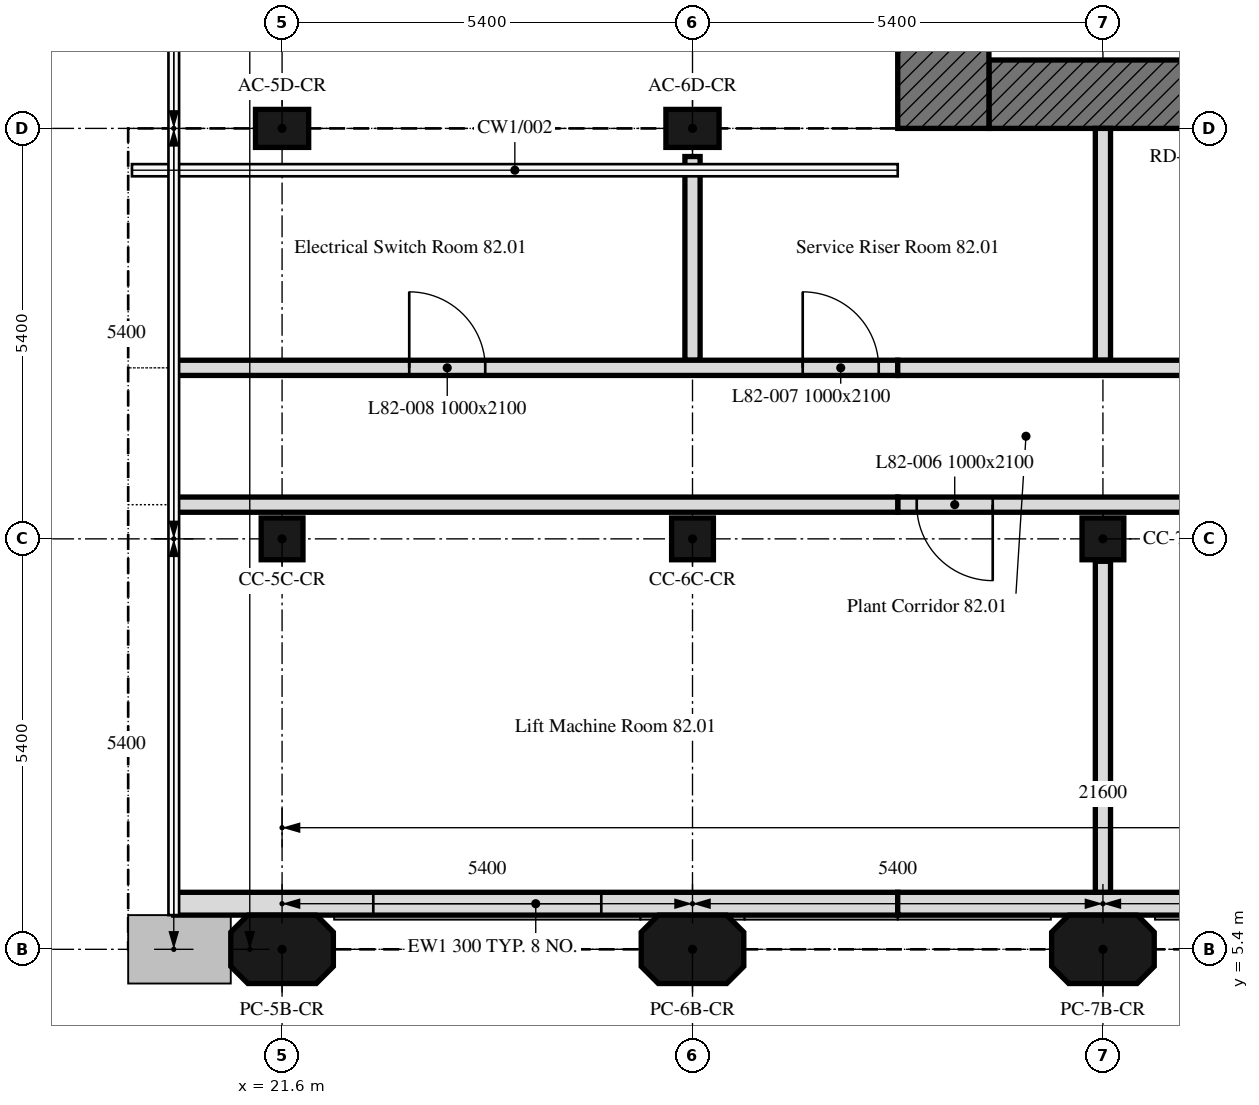
"""IFC4 building model, lengths in metres.
Left out: names, types, materials, properties, quantities, classifications, styles, units other than length and angle.
Written with IfcOpenShell. Run it as: python <this file> out.ifc"""

import sys

from ifc_helpers import new_model, si_unit, direction, frame, frame_2d, origin, origin_2d, place, context, subcontext, project, spatial, polyline, rectangle, outline, extrude, element, fill, save


model = new_model("IFC4")
c1 = context("Model", 3, precision=1e-05, world=origin(), true_north=direction((0.0, 1.0)))
c2 = subcontext(c1, "Body", "Model", "MODEL_VIEW")
j1 = project(units=[si_unit("LENGTHUNIT", "METRE"), si_unit("PLANEANGLEUNIT", "RADIAN")], contexts=[c1])
p1 = place(None, origin())
s1 = spatial("IfcSite", under=j1, at=p1, CompositionType="ELEMENT")
p2 = place(p1, origin())
s2 = spatial("IfcBuilding", under=s1, at=p2, CompositionType="ELEMENT")
p3 = place(p2, frame((0.0, 0.0, 330.7)))
s3 = spatial("IfcBuildingStorey", under=s2, at=p3, CompositionType="ELEMENT", Elevation=330.7)
p4 = place(p3, frame((21.6, 5.4, 0.0), z_axis=(0.0, 0.0, 1.0), x_axis=(1.0, 0.0, 0.0)))
e1 = element("IfcColumn", 1, at=p4, inside=s3, PredefinedType="COLUMN", context=c2, shape_type="SweptSolid", body=[
    extrude(outline(polyline([(-0.45, -0.45), (0.45, -0.45), (0.675, -0.225), (0.675, 0.225), (0.45, 0.45), (-0.45, 0.45), (-0.675, 0.225), (-0.675, -0.225), (-0.45, -0.45)])), origin(), (0.0, 0.0, 1.0), 3.6),
])
for number, where, z_axis, x_axis in (
    (2, (27.0, 5.4, 0.0), (0.0, 0.0, 1.0), (1.0, 0.0, 0.0)),
    (3, (32.4, 5.4, 0.0), (0.0, 0.0, 1.0), (1.0, 0.0, 0.0)),
):
    element("IfcColumn", number, at=place(p3, frame(where, z_axis=z_axis, x_axis=x_axis)), inside=s3, PredefinedType="COLUMN", context=c2, shape_type="SweptSolid", body=[
        extrude(outline(polyline([(-0.45, -0.45), (0.45, -0.45), (0.675, -0.225), (0.675, 0.225), (0.45, 0.45), (-0.45, 0.45), (-0.675, 0.225), (-0.675, -0.225), (-0.45, -0.45)])), origin(), (0.0, 0.0, 1.0), 4.2),
    ])
p5 = place(p3, frame((21.6, 10.8, 0.0), z_axis=(0.0, 0.0, 1.0), x_axis=(1.0, 0.0, 0.0)))
e4 = element("IfcColumn", 4, at=p5, inside=s3, PredefinedType="COLUMN", context=c2, shape_type="SweptSolid", body=[
    extrude(rectangle(XDim=0.55, YDim=0.55, at=origin_2d()), origin(), (0.0, 0.0, 1.0), 3.6),
])
for number, where, z_axis, x_axis in (
    (5, (27.0, 10.8, 0.0), (0.0, 0.0, 1.0), (1.0, 0.0, 0.0)),
    (6, (32.4, 10.8, 0.0), (0.0, 0.0, 1.0), (1.0, 0.0, 0.0)),
):
    element("IfcColumn", number, at=place(p3, frame(where, z_axis=z_axis, x_axis=x_axis)), inside=s3, PredefinedType="COLUMN", context=c2, shape_type="SweptSolid", body=[
        extrude(rectangle(XDim=0.55, YDim=0.55, at=origin_2d()), origin(), (0.0, 0.0, 1.0), 4.2),
    ])
p6 = place(p3, frame((21.6, 16.2, 0.0), z_axis=(0.0, 0.0, 1.0), x_axis=(1.0, 0.0, 0.0)))
e7 = element("IfcColumn", 7, at=p6, inside=s3, PredefinedType="COLUMN", context=c2, shape_type="SweptSolid", body=[
    extrude(rectangle(XDim=0.7, YDim=0.5, at=origin_2d()), origin(), (0.0, 0.0, 1.0), 3.6),
])
p7 = place(p3, frame((27.0, 16.2, 0.0), z_axis=(0.0, 0.0, 1.0), x_axis=(1.0, 0.0, 0.0)))
e8 = element("IfcColumn", 8, at=p7, inside=s3, PredefinedType="COLUMN", context=c2, shape_type="SweptSolid", body=[
    extrude(rectangle(XDim=0.7, YDim=0.5, at=origin_2d()), origin(), (0.0, 0.0, 1.0), 4.2),
])
p8 = place(p3, frame((20.175, 6.0, 0.0), z_axis=(0.0, 0.0, 1.0), x_axis=(1.0, 0.0, 0.0)))
e9 = element("IfcWall", 9, at=p8, inside=s3, PredefinedType="SOLIDWALL", context=c2, shape_type="SweptSolid", body=[
    extrude(outline(polyline([(0.0, 0.0), (9.525, 0.0), (9.525, 4.2), (8.93, 6.936), (8.334, 6.671), (7.739, 6.406), (7.144, 6.142), (6.548, 5.877), (5.953, 5.613), (5.358, 5.348), (4.762, 5.083), (4.167, 4.819), (3.572, 4.554), (2.977, 4.29), (2.381, 4.025), (1.786, 3.76), (1.191, 3.496), (0.595, 3.231), (0.0, 2.967), (0.0, 0.0)])), frame((0.0, 0.15, 0.0), z_axis=(0.0, -1.0, 0.0), x_axis=(1.0, 0.0, 0.0)), (0.0, 0.0, 1.0), 0.3),
])
p9 = place(p8, frame((2.625, 0.0, 0.6)))
e10 = element("IfcOpeningElement", 10, at=p9, cuts=e9, PredefinedType="OPENING", context=c2, shape_type="SweptSolid", body=[
    extrude(rectangle(XDim=3.0, YDim=1.8, at=frame_2d((1.5, 0.9))), frame((0.0, 0.16, 0.0), z_axis=(0.0, -1.0, 0.0), x_axis=(1.0, 0.0, 0.0)), (0.0, 0.0, 1.0), 0.32),
])
p10 = place(p3, frame((29.7, 6.0, 0.0), z_axis=(0.0, 0.0, 1.0), x_axis=(1.0, 0.0, 0.0)))
e11 = element("IfcWall", 11, at=p10, inside=s3, PredefinedType="SOLIDWALL", context=c2, shape_type="SweptSolid", body=[
    extrude(outline(polyline([(0.0, 0.0), (7.914, 0.0), (7.914, 4.2), (7.348, 4.2), (6.783, 4.2), (6.218, 4.2), (5.653, 4.2), (5.087, 4.2), (4.522, 4.2), (3.957, 4.2), (3.392, 4.2), (2.826, 4.2), (2.261, 4.2), (1.696, 4.2), (1.131, 4.2), (0.565, 4.2), (0.0, 4.2), (0.0, 0.0)])), frame((0.0, 0.15, 0.0), z_axis=(0.0, -1.0, 0.0), x_axis=(1.0, 0.0, 0.0)), (0.0, 0.0, 1.0), 0.3),
])
p11 = place(p10, frame((3.9, 0.0, 0.6)))
e12 = element("IfcOpeningElement", 12, at=p11, cuts=e11, PredefinedType="OPENING", context=c2, shape_type="SweptSolid", body=[
    extrude(rectangle(XDim=3.0, YDim=1.8, at=frame_2d((1.5, 0.9))), frame((0.0, 0.16, 0.0), z_axis=(0.0, -1.0, 0.0), x_axis=(1.0, 0.0, 0.0)), (0.0, 0.0, 1.0), 0.32),
])
p12 = place(p3, frame((42.0, 16.65, 0.0), z_axis=(0.0, 0.0, 1.0), x_axis=(-1.0, 0.0, 0.0)))
e13 = element("IfcWall", 13, at=p12, inside=s3, PredefinedType="SOLIDWALL", context=c2, shape_type="SweptSolid", body=[
    extrude(rectangle(XDim=11.1, YDim=0.9, at=frame_2d((5.55, 0.0))), origin(), (0.0, 0.0, 1.0), 4.2),
])
p13 = place(p12, frame((3.55, 0.0, 0.0)))
e14 = element("IfcOpeningElement", 14, at=p13, cuts=e13, PredefinedType="OPENING", context=c2, shape_type="SweptSolid", body=[
    extrude(rectangle(XDim=2.0, YDim=2.4, at=frame_2d((1.0, 1.2))), frame((0.0, 0.45, 0.0), z_axis=(0.0, -1.0, 0.0), x_axis=(1.0, 0.0, 0.0)), (0.0, 0.0, 1.0), 0.9),
])
p14 = place(p3, frame((30.3, 16.2, 0.0), z_axis=(0.0, 0.0, 1.0), x_axis=(0.0, 1.0, 0.0)))
e15 = element("IfcWall", 15, at=p14, inside=s3, PredefinedType="SOLIDWALL", context=c2, shape_type="SweptSolid", body=[
    extrude(rectangle(XDim=16.2, YDim=1.2, at=frame_2d((8.1, 0.0))), origin(), (0.0, 0.0, 1.0), 4.2),
])
p15 = place(p3, frame((32.4, 10.505, 0.0), z_axis=(0.0, 0.0, 1.0), x_axis=(0.0, -1.0, 0.0)))
e16 = element("IfcWall", 16, at=p15, inside=s3, PredefinedType="PARTITIONING", context=c2, shape_type="SweptSolid", body=[
    extrude(rectangle(XDim=4.354, YDim=0.2, at=frame_2d((2.177, 0.0))), origin(), (0.0, 0.0, 1.0), 4.2),
])
p16 = place(p3, frame((42.449, 11.25, 0.0), z_axis=(0.0, 0.0, 1.0), x_axis=(-1.0, 0.0, 0.0)))
e17 = element("IfcWall", 17, at=p16, inside=s3, PredefinedType="PARTITIONING", context=c2, shape_type="SweptSolid", body=[
    extrude(rectangle(XDim=12.749, YDim=0.2, at=frame_2d((6.375, 0.0))), origin(), (0.0, 0.0, 1.0), 4.2),
])
p17 = place(p16, frame((6.832, 0.0, 0.0)))
e18 = element("IfcOpeningElement", 18, at=p17, cuts=e17, PredefinedType="OPENING", context=c2, shape_type="SweptSolid", body=[
    extrude(rectangle(XDim=1.0, YDim=2.1, at=frame_2d((0.5, 1.05))), frame((0.0, 0.1, 0.0), z_axis=(0.0, -1.0, 0.0), x_axis=(1.0, 0.0, 0.0)), (0.0, 0.0, 1.0), 0.2),
])
p18 = place(p16, frame((11.499, 0.0, 0.0)))
e19 = element("IfcOpeningElement", 19, at=p18, cuts=e17, PredefinedType="OPENING", context=c2, shape_type="SweptSolid", body=[
    extrude(rectangle(XDim=1.0, YDim=2.1, at=frame_2d((0.5, 1.05))), frame((0.0, 0.1, 0.0), z_axis=(0.0, -1.0, 0.0), x_axis=(1.0, 0.0, 0.0)), (0.0, 0.0, 1.0), 0.2),
])
p19 = place(p3, frame((29.7, 11.25, 0.0), z_axis=(0.0, 0.0, 1.0), x_axis=(-1.0, 0.0, 0.0)))
e20 = element("IfcWall", 20, at=p19, inside=s3, PredefinedType="PARTITIONING", context=c2, shape_type="SweptSolid", body=[
    extrude(outline(polyline([(0.0, 0.0), (9.525, 0.0), (9.525, 2.967), (0.0, 4.2), (0.0, 0.0)])), frame((0.0, 0.1, 0.0), z_axis=(0.0, -1.0, 0.0), x_axis=(1.0, 0.0, 0.0)), (0.0, 0.0, 1.0), 0.2),
])
p20 = place(p3, frame((27.0, 15.83, 0.0), z_axis=(0.0, 0.0, 1.0), x_axis=(0.0, -1.0, 0.0)))
e21 = element("IfcWall", 21, at=p20, inside=s3, PredefinedType="PARTITIONING", context=c2, shape_type="SweptSolid", body=[
    extrude(rectangle(XDim=2.68, YDim=0.2, at=frame_2d((1.34, 0.0))), origin(), (0.0, 0.0, 1.0), 6.0),
])
p21 = place(p3, frame((32.4, 13.15, 0.0), z_axis=(0.0, 0.0, 1.0), x_axis=(0.0, 1.0, 0.0)))
e22 = element("IfcWall", 22, at=p21, inside=s3, PredefinedType="PARTITIONING", context=c2, shape_type="SweptSolid", body=[
    extrude(rectangle(XDim=3.05, YDim=0.2, at=frame_2d((1.525, 0.0))), origin(), (0.0, 0.0, 1.0), 4.2),
])
p22 = place(p3, frame((20.175, 13.05, 0.0), z_axis=(0.0, 0.0, 1.0), x_axis=(1.0, 0.0, 0.0)))
e23 = element("IfcWall", 23, at=p22, inside=s3, PredefinedType="PARTITIONING", context=c2, shape_type="SweptSolid", body=[
    extrude(outline(polyline([(0.0, 0.0), (9.525, 0.0), (9.525, 4.2), (0.0, 2.967), (0.0, 0.0)])), frame((0.0, 0.1, 0.0), z_axis=(0.0, -1.0, 0.0), x_axis=(1.0, 0.0, 0.0)), (0.0, 0.0, 1.0), 0.2),
])
p23 = place(p22, frame((8.275, 0.0, 0.0)))
e24 = element("IfcOpeningElement", 24, at=p23, cuts=e23, PredefinedType="OPENING", context=c2, shape_type="SweptSolid", body=[
    extrude(rectangle(XDim=1.0, YDim=2.1, at=frame_2d((0.5, 1.05))), frame((0.0, 0.1, 0.0), z_axis=(0.0, -1.0, 0.0), x_axis=(1.0, 0.0, 0.0)), (0.0, 0.0, 1.0), 0.2),
])
p24 = place(p22, frame((3.098, 0.0, 0.0)))
e25 = element("IfcOpeningElement", 25, at=p24, cuts=e23, PredefinedType="OPENING", context=c2, shape_type="SweptSolid", body=[
    extrude(rectangle(XDim=1.0, YDim=2.1, at=frame_2d((0.5, 1.05))), frame((0.0, 0.1, 0.0), z_axis=(0.0, -1.0, 0.0), x_axis=(1.0, 0.0, 0.0)), (0.0, 0.0, 1.0), 0.2),
])
p25 = place(p3, frame((29.7, 13.05, 0.0), z_axis=(0.0, 0.0, 1.0), x_axis=(1.0, 0.0, 0.0)))
e26 = element("IfcWall", 26, at=p25, inside=s3, PredefinedType="PARTITIONING", context=c2, shape_type="SweptSolid", body=[
    extrude(rectangle(XDim=11.649, YDim=0.2, at=frame_2d((5.825, 0.0))), origin(), (0.0, 0.0, 1.0), 4.2),
])
p26 = place(p25, frame((5.1, 0.0, 0.0)))
e27 = element("IfcOpeningElement", 27, at=p26, cuts=e26, PredefinedType="OPENING", context=c2, shape_type="SweptSolid", body=[
    extrude(rectangle(XDim=1.8, YDim=2.4, at=frame_2d((0.9, 1.2))), frame((0.0, 0.1, 0.0), z_axis=(0.0, -1.0, 0.0), x_axis=(1.0, 0.0, 0.0)), (0.0, 0.0, 1.0), 0.2),
])
p27 = place(p9, origin())
e28 = element("IfcWindow", 28, at=p27, inside=s3, PartitioningType="SINGLE_PANEL", PredefinedType="WINDOW", context=c2, shape_type="SweptSolid", body=[
    extrude(rectangle(XDim=3.0, YDim=1.8, at=frame_2d((1.5, 0.9))), frame((0.0, 0.03, 0.0), z_axis=(0.0, -1.0, 0.0), x_axis=(1.0, 0.0, 0.0)), (0.0, 0.0, 1.0), 0.06),
])
fill(e10, e28)
p28 = place(p18, origin())
e29 = element("IfcDoor", 29, at=p28, inside=s3, OperationType="SINGLE_SWING_LEFT", PredefinedType="DOOR", context=c2, shape_type="SweptSolid", body=[
    extrude(rectangle(XDim=1.0, YDim=2.1, at=frame_2d((0.5, 1.05))), frame((0.0, 0.025, 0.0), z_axis=(0.0, -1.0, 0.0), x_axis=(1.0, 0.0, 0.0)), (0.0, 0.0, 1.0), 0.05),
])
fill(e19, e29)
p29 = place(p23, origin())
e30 = element("IfcDoor", 30, at=p29, inside=s3, OperationType="SINGLE_SWING_RIGHT", PredefinedType="DOOR", context=c2, shape_type="SweptSolid", body=[
    extrude(rectangle(XDim=1.0, YDim=2.1, at=frame_2d((0.5, 1.05))), frame((0.0, 0.025, 0.0), z_axis=(0.0, -1.0, 0.0), x_axis=(1.0, 0.0, 0.0)), (0.0, 0.0, 1.0), 0.05),
])
fill(e24, e30)
p30 = place(p24, origin())
e31 = element("IfcDoor", 31, at=p30, inside=s3, OperationType="SINGLE_SWING_LEFT", PredefinedType="DOOR", context=c2, shape_type="SweptSolid", body=[
    extrude(rectangle(XDim=1.0, YDim=2.1, at=frame_2d((0.5, 1.05))), frame((0.0, 0.025, 0.0), z_axis=(0.0, -1.0, 0.0), x_axis=(1.0, 0.0, 0.0)), (0.0, 0.0, 1.0), 0.05),
])
fill(e25, e31)
save(model, sys.argv[1])
